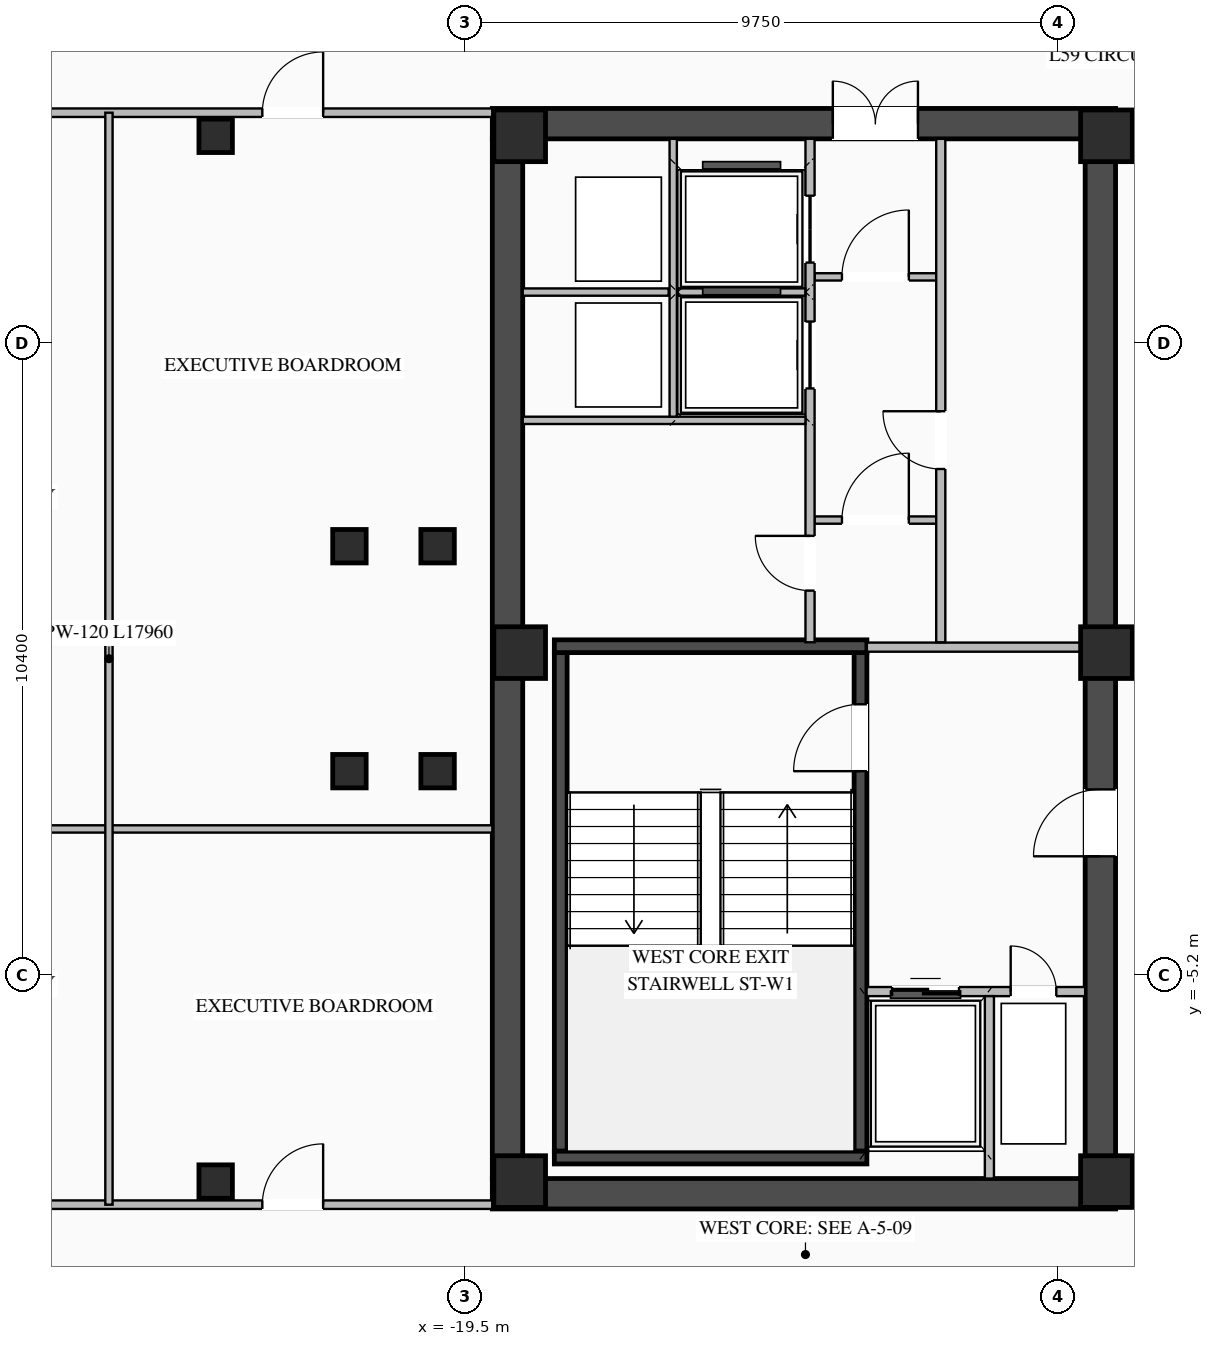
"""IFC4 building model, lengths in metres.
Left out: names, types, materials, properties, quantities, classifications, styles, units other than length and angle.
Written with IfcOpenShell. Run it as: python <this file> out.ifc"""

import sys

from ifc_helpers import new_model, si_unit, direction, frame, frame_2d, origin, origin_2d, place, context, subcontext, project, spatial, rectangle, i_section, extrude, element, fill, save


model = new_model("IFC4")
c1 = context("Model", 3, precision=1e-05, world=origin(), true_north=direction((0.0, 1.0)))
c2 = subcontext(c1, "Body", "Model", "MODEL_VIEW")
j1 = project(units=[si_unit("LENGTHUNIT", "METRE"), si_unit("PLANEANGLEUNIT", "RADIAN")], contexts=[c1])
p1 = place(None, origin())
s1 = spatial("IfcSite", under=j1, at=p1, CompositionType="ELEMENT")
p2 = place(p1, origin())
s2 = spatial("IfcBuilding", under=s1, at=p2, CompositionType="ELEMENT")
p3 = place(p2, frame((0.0, 0.0, 218.85)))
s3 = spatial("IfcBuildingStorey", under=s2, at=p3, CompositionType="ELEMENT", Elevation=218.85)
p4 = place(p3, frame((-19.05, -8.8, 0.0), z_axis=(0.0, 0.0, 1.0), x_axis=(1.0, 0.0, 0.0)))
e1 = element("IfcWall", 1, at=p4, inside=s3, PredefinedType="SHEAR", context=c2, shape_type="SweptSolid", body=[
    extrude(rectangle(XDim=10.25, YDim=0.5, at=frame_2d((5.125, 0.0))), origin(), (0.0, 0.0, 1.0), 3.27),
])
p5 = place(p3, frame((-19.05, 8.8, 0.0), z_axis=(0.0, 0.0, 1.0), x_axis=(1.0, 0.0, 0.0)))
e2 = element("IfcWall", 2, at=p5, inside=s3, PredefinedType="SHEAR", context=c2, shape_type="SweptSolid", body=[
    extrude(rectangle(XDim=10.25, YDim=0.5, at=frame_2d((5.125, 0.0))), origin(), (0.0, 0.0, 1.0), 3.27),
])
p6 = place(p5, frame((5.6, 0.0, 0.0)))
e3 = element("IfcOpeningElement", 3, at=p6, cuts=e2, PredefinedType="OPENING", context=c2, shape_type="SweptSolid", body=[
    extrude(rectangle(XDim=1.4, YDim=2.05, at=frame_2d((0.7, 1.025))), frame((0.0, 0.26, 0.0), z_axis=(0.0, -1.0, 0.0), x_axis=(1.0, 0.0, 0.0)), (0.0, 0.0, 1.0), 0.52),
])
p7 = place(p3, frame((-18.8, -8.55, 0.0), z_axis=(0.0, 0.0, 1.0), x_axis=(0.0, 1.0, 0.0)))
e4 = element("IfcWall", 4, at=p7, inside=s3, PredefinedType="SHEAR", context=c2, shape_type="SweptSolid", body=[
    extrude(rectangle(XDim=17.1, YDim=0.5, at=frame_2d((8.55, 0.0))), origin(), (0.0, 0.0, 1.0), 3.27),
])
p8 = place(p3, frame((-9.05, -8.55, 0.0), z_axis=(0.0, 0.0, 1.0), x_axis=(0.0, 1.0, 0.0)))
e5 = element("IfcWall", 5, at=p8, inside=s3, PredefinedType="SHEAR", context=c2, shape_type="SweptSolid", body=[
    extrude(rectangle(XDim=17.1, YDim=0.5, at=frame_2d((8.55, 0.0))), origin(), (0.0, 0.0, 1.0), 3.27),
])
p9 = place(p8, frame((5.3, 0.0, 0.0)))
e6 = element("IfcOpeningElement", 6, at=p9, cuts=e5, PredefinedType="OPENING", context=c2, shape_type="SweptSolid", body=[
    extrude(rectangle(XDim=1.1, YDim=2.08, at=frame_2d((0.55, 1.04))), frame((0.0, 0.26, 0.0), z_axis=(0.0, -1.0, 0.0), x_axis=(1.0, 0.0, 0.0)), (0.0, 0.0, 1.0), 0.52),
])
p10 = place(p3, frame((-12.995, -8.1, 0.0), z_axis=(0.0, 0.0, 1.0), x_axis=(0.0, 1.0, 0.0)))
e7 = element("IfcWall", 7, at=p10, inside=s3, PredefinedType="SHEAR", context=c2, shape_type="SweptSolid", body=[
    extrude(rectangle(XDim=8.2, YDim=0.21, at=frame_2d((4.1, 0.0))), origin(), (0.0, 0.0, 1.0), 3.27),
])
p11 = place(p10, frame((6.25, 0.0, 0.0)))
e8 = element("IfcOpeningElement", 8, at=p11, cuts=e7, PredefinedType="OPENING", context=c2, shape_type="SweptSolid", body=[
    extrude(rectangle(XDim=1.1, YDim=2.15, at=frame_2d((0.55, 1.075))), frame((0.0, 0.115, 0.0), z_axis=(0.0, -1.0, 0.0), x_axis=(1.0, 0.0, 0.0)), (0.0, 0.0, 1.0), 0.23),
])
p12 = place(p3, frame((-17.925, -8.1, 0.0), z_axis=(0.0, 0.0, 1.0), x_axis=(0.0, 1.0, 0.0)))
e9 = element("IfcWall", 9, at=p12, inside=s3, PredefinedType="SHEAR", context=c2, shape_type="SweptSolid", body=[
    extrude(rectangle(XDim=8.2, YDim=0.21, at=frame_2d((4.1, 0.0))), origin(), (0.0, 0.0, 1.0), 3.27),
])
for number, where, z_axis, x_axis in (
    (10, (-18.03, -8.205, 0.0), (0.0, 0.0, 1.0), (1.0, 0.0, 0.0)),
    (11, (-12.89, 0.205, 0.0), (0.0, 0.0, 1.0), (-1.0, 0.0, 0.0)),
):
    element("IfcWall", number, at=place(p3, frame(where, z_axis=z_axis, x_axis=x_axis)), inside=s3, PredefinedType="SHEAR", context=c2, shape_type="SweptSolid", body=[
        extrude(rectangle(XDim=5.14, YDim=0.21, at=frame_2d((2.57, 0.0))), origin(), (0.0, 0.0, 1.0), 3.27),
    ])
for number, where, z_axis, x_axis in (
    (12, (-8.95, -8.6, 0.0), (0.0, 0.0, 1.0), (1.0, 0.0, 0.0)),
    (13, (-8.95, 0.1, 0.0), (0.0, 0.0, 1.0), (1.0, 0.0, 0.0)),
    (14, (-8.95, 8.6, 0.0), (0.0, 0.0, 1.0), (1.0, 0.0, 0.0)),
    (15, (-18.6, -8.6, 0.0), (0.0, 0.0, 1.0), (1.0, 0.0, 0.0)),
    (16, (-18.6, 0.1, 0.0), (0.0, 0.0, 1.0), (1.0, 0.0, 0.0)),
    (17, (-18.6, 8.6, 0.0), (0.0, 0.0, 1.0), (1.0, 0.0, 0.0)),
):
    element("IfcColumn", number, at=place(p3, frame(where, z_axis=z_axis, x_axis=x_axis)), inside=s3, PredefinedType="COLUMN", context=c2, shape_type="SweptSolid", body=[
        extrude(rectangle(XDim=0.85, YDim=0.85, at=origin_2d()), origin(), (0.0, 0.0, 1.0), 3.45),
    ])
for number, where, z_axis, x_axis in (
    (18, (-21.4, -1.85, 0.0), (0.0, 0.0, 1.0), (1.0, 0.0, 0.0)),
    (19, (-21.4, 1.85, 0.0), (0.0, 0.0, 1.0), (1.0, 0.0, 0.0)),
    (20, (-19.95, -1.85, 0.0), (0.0, 0.0, 1.0), (1.0, 0.0, 0.0)),
    (21, (-19.95, 1.85, 0.0), (0.0, 0.0, 1.0), (1.0, 0.0, 0.0)),
    (22, (-23.6, -8.6, 0.0), (0.0, 0.0, 1.0), (1.0, 0.0, 0.0)),
    (23, (-23.6, 8.6, 0.0), (0.0, 0.0, 1.0), (1.0, 0.0, 0.0)),
):
    element("IfcColumn", number, at=place(p3, frame(where, z_axis=z_axis, x_axis=x_axis)), inside=s3, PredefinedType="COLUMN", context=c2, shape_type="SweptSolid", body=[
        extrude(i_section(OverallWidth=0.55, OverallDepth=0.55, WebThickness=0.024, FlangeThickness=0.036, at=origin_2d()), origin(), (0.0, 0.0, 1.0), 3.45),
    ])
p13 = place(p3, frame((-12.895, -5.475, 0.0), z_axis=(0.0, 0.0, 1.0), x_axis=(1.0, 0.0, 0.0)))
e24 = element("IfcWall", 24, at=p13, inside=s3, PredefinedType="STANDARD", context=c2, shape_type="SweptSolid", body=[
    extrude(rectangle(XDim=3.595, YDim=0.15, at=frame_2d((1.797, 0.0))), origin(), (0.0, 0.0, 1.0), 3.25),
])
p14 = place(p13, frame((0.42, 0.0, 0.0)))
e25 = element("IfcOpeningElement", 25, at=p14, cuts=e24, PredefinedType="OPENING", context=c2, shape_type="SweptSolid", body=[
    extrude(rectangle(XDim=1.1, YDim=2.15, at=frame_2d((0.55, 1.075))), frame((0.0, 0.085, 0.0), z_axis=(0.0, -1.0, 0.0), x_axis=(1.0, 0.0, 0.0)), (0.0, 0.0, 1.0), 0.17),
])
p15 = place(p13, frame((2.37, 0.0, 0.0)))
e26 = element("IfcOpeningElement", 26, at=p15, cuts=e24, PredefinedType="OPENING", context=c2, shape_type="SweptSolid", body=[
    extrude(rectangle(XDim=0.75, YDim=2.05, at=frame_2d((0.375, 1.025))), frame((0.0, 0.085, 0.0), z_axis=(0.0, -1.0, 0.0), x_axis=(1.0, 0.0, 0.0)), (0.0, 0.0, 1.0), 0.17),
])
p16 = place(p3, frame((-10.875, -8.55, 0.0), z_axis=(0.0, 0.0, 1.0), x_axis=(0.0, 1.0, 0.0)))
e27 = element("IfcWall", 27, at=p16, inside=s3, PredefinedType="STANDARD", context=c2, shape_type="SweptSolid", body=[
    extrude(rectangle(XDim=3.0, YDim=0.15, at=frame_2d((1.5, 0.0))), origin(), (0.0, 0.0, 1.0), 3.25),
])
p17 = place(p3, frame((-12.89, 0.19, 0.0), z_axis=(0.0, 0.0, 1.0), x_axis=(1.0, 0.0, 0.0)))
e28 = element("IfcWall", 28, at=p17, inside=s3, PredefinedType="STANDARD", context=c2, shape_type="SweptSolid", body=[
    extrude(rectangle(XDim=3.59, YDim=0.15, at=frame_2d((1.795, 0.0))), origin(), (0.0, 0.0, 1.0), 2.645),
])
p18 = place(p3, frame((-13.75, 2.28, 0.0), z_axis=(0.0, 0.0, 1.0), x_axis=(1.0, 0.0, 0.0)))
e29 = element("IfcWall", 29, at=p18, inside=s3, PredefinedType="STANDARD", context=c2, shape_type="SweptSolid", body=[
    extrude(rectangle(XDim=2.0, YDim=0.12, at=frame_2d((1.0, 0.0))), origin(), (0.0, 0.0, 1.0), 3.25),
])
p19 = place(p18, frame((0.45, 0.0, 0.0)))
e30 = element("IfcOpeningElement", 30, at=p19, cuts=e29, PredefinedType="OPENING", context=c2, shape_type="SweptSolid", body=[
    extrude(rectangle(XDim=1.1, YDim=2.1, at=frame_2d((0.55, 1.05))), frame((0.0, 0.07, 0.0), z_axis=(0.0, -1.0, 0.0), x_axis=(1.0, 0.0, 0.0)), (0.0, 0.0, 1.0), 0.14),
])
p20 = place(p3, frame((-13.75, 6.28, 0.0), z_axis=(0.0, 0.0, 1.0), x_axis=(1.0, 0.0, 0.0)))
e31 = element("IfcWall", 31, at=p20, inside=s3, PredefinedType="STANDARD", context=c2, shape_type="SweptSolid", body=[
    extrude(rectangle(XDim=2.0, YDim=0.12, at=frame_2d((1.0, 0.0))), origin(), (0.0, 0.0, 1.0), 3.25),
])
p21 = place(p20, frame((0.45, 0.0, 0.0)))
e32 = element("IfcOpeningElement", 32, at=p21, cuts=e31, PredefinedType="OPENING", context=c2, shape_type="SweptSolid", body=[
    extrude(rectangle(XDim=1.1, YDim=2.1, at=frame_2d((0.55, 1.05))), frame((0.0, 0.07, 0.0), z_axis=(0.0, -1.0, 0.0), x_axis=(1.0, 0.0, 0.0)), (0.0, 0.0, 1.0), 0.14),
])
p22 = place(p3, frame((-11.675, 0.27, 0.0), z_axis=(0.0, 0.0, 1.0), x_axis=(0.0, 1.0, 0.0)))
e33 = element("IfcWall", 33, at=p22, inside=s3, PredefinedType="STANDARD", context=c2, shape_type="SweptSolid", body=[
    extrude(rectangle(XDim=8.28, YDim=0.15, at=frame_2d((4.14, 0.0))), origin(), (0.0, 0.0, 1.0), 3.25),
])
p23 = place(p22, frame((2.85, 0.0, 0.0)))
e34 = element("IfcOpeningElement", 34, at=p23, cuts=e33, PredefinedType="OPENING", context=c2, shape_type="SweptSolid", body=[
    extrude(rectangle(XDim=0.95, YDim=2.05, at=frame_2d((0.475, 1.025))), frame((0.0, 0.085, 0.0), z_axis=(0.0, -1.0, 0.0), x_axis=(1.0, 0.0, 0.0)), (0.0, 0.0, 1.0), 0.17),
])
p24 = place(p3, frame((-13.825, 0.27, 0.0), z_axis=(0.0, 0.0, 1.0), x_axis=(0.0, 1.0, 0.0)))
e35 = element("IfcWall", 35, at=p24, inside=s3, PredefinedType="STANDARD", context=c2, shape_type="SweptSolid", body=[
    extrude(rectangle(XDim=8.28, YDim=0.15, at=frame_2d((4.14, 0.0))), origin(), (0.0, 0.0, 1.0), 3.25),
])
p25 = place(p24, frame((4.175, 0.0, 0.0)))
e36 = element("IfcOpeningElement", 36, at=p25, cuts=e35, PredefinedType="OPENING", context=c2, shape_type="SweptSolid", body=[
    extrude(rectangle(XDim=1.1, YDim=2.1, at=frame_2d((0.55, 1.05))), frame((0.0, 0.085, 0.0), z_axis=(0.0, -1.0, 0.0), x_axis=(1.0, 0.0, 0.0)), (0.0, 0.0, 1.0), 0.17),
])
p26 = place(p24, frame((6.245, 0.0, 0.0)))
e37 = element("IfcOpeningElement", 37, at=p26, cuts=e35, PredefinedType="OPENING", context=c2, shape_type="SweptSolid", body=[
    extrude(rectangle(XDim=1.1, YDim=2.1, at=frame_2d((0.55, 1.05))), frame((0.0, 0.085, 0.0), z_axis=(0.0, -1.0, 0.0), x_axis=(1.0, 0.0, 0.0)), (0.0, 0.0, 1.0), 0.17),
])
p27 = place(p24, frame((0.85, 0.0, 0.0)))
e38 = element("IfcOpeningElement", 38, at=p27, cuts=e35, PredefinedType="OPENING", context=c2, shape_type="SweptSolid", body=[
    extrude(rectangle(XDim=0.9, YDim=2.05, at=frame_2d((0.45, 1.025))), frame((0.0, 0.085, 0.0), z_axis=(0.0, -1.0, 0.0), x_axis=(1.0, 0.0, 0.0)), (0.0, 0.0, 1.0), 0.17),
])
p28 = place(p3, frame((-18.55, 3.92, 0.0), z_axis=(0.0, 0.0, 1.0), x_axis=(1.0, 0.0, 0.0)))
e39 = element("IfcWall", 39, at=p28, inside=s3, PredefinedType="STANDARD", context=c2, shape_type="SweptSolid", body=[
    extrude(rectangle(XDim=4.65, YDim=0.12, at=frame_2d((2.325, 0.0))), origin(), (0.0, 0.0, 1.0), 3.25),
])
p29 = place(p3, frame((-18.55, 6.03, 0.0), z_axis=(0.0, 0.0, 1.0), x_axis=(1.0, 0.0, 0.0)))
e40 = element("IfcWall", 40, at=p29, inside=s3, PredefinedType="STANDARD", context=c2, shape_type="SweptSolid", body=[
    extrude(rectangle(XDim=2.4, YDim=0.12, at=frame_2d((1.2, 0.0))), origin(), (0.0, 0.0, 1.0), 3.25),
])
p30 = place(p3, frame((-16.075, 3.98, 0.0), z_axis=(0.0, 0.0, 1.0), x_axis=(0.0, 1.0, 0.0)))
e41 = element("IfcWall", 41, at=p30, inside=s3, PredefinedType="STANDARD", context=c2, shape_type="SweptSolid", body=[
    extrude(rectangle(XDim=4.57, YDim=0.12, at=frame_2d((2.285, 0.0))), origin(), (0.0, 0.0, 1.0), 3.25),
])
p31 = place(p3, frame((-16.0, 6.03, 0.0), z_axis=(0.0, 0.0, 1.0), x_axis=(1.0, 0.0, 0.0)))
e42 = element("IfcWall", 42, at=p31, inside=s3, PredefinedType="STANDARD", context=c2, shape_type="SweptSolid", body=[
    extrude(rectangle(XDim=2.1, YDim=0.12, at=frame_2d((1.05, 0.0))), origin(), (0.0, 0.0, 1.0), 3.25),
])
p32 = place(p3, frame((-29.62, 8.98, 0.0), z_axis=(0.0, 0.0, 1.0), x_axis=(1.0, 0.0, 0.0)))
e43 = element("IfcWall", 43, at=p32, inside=s3, PredefinedType="STANDARD", context=c2, shape_type="SweptSolid", body=[
    extrude(rectangle(XDim=10.57, YDim=0.14, at=frame_2d((5.285, 0.0))), origin(), (0.0, 0.0, 1.0), 3.25),
])
p33 = place(p32, frame((1.762, 0.0, 0.0)))
e44 = element("IfcOpeningElement", 44, at=p33, cuts=e43, PredefinedType="OPENING", context=c2, shape_type="SweptSolid", body=[
    extrude(rectangle(XDim=1.0, YDim=2.08, at=frame_2d((0.5, 1.04))), frame((0.0, 0.08, 0.0), z_axis=(0.0, -1.0, 0.0), x_axis=(1.0, 0.0, 0.0)), (0.0, 0.0, 1.0), 0.16),
])
p34 = place(p32, frame((6.788, 0.0, 0.0)))
e45 = element("IfcOpeningElement", 45, at=p34, cuts=e43, PredefinedType="OPENING", context=c2, shape_type="SweptSolid", body=[
    extrude(rectangle(XDim=1.0, YDim=2.08, at=frame_2d((0.5, 1.04))), frame((0.0, 0.08, 0.0), z_axis=(0.0, -1.0, 0.0), x_axis=(1.0, 0.0, 0.0)), (0.0, 0.0, 1.0), 0.16),
])
p35 = place(p3, frame((-29.62, -8.98, 0.0), z_axis=(0.0, 0.0, 1.0), x_axis=(1.0, 0.0, 0.0)))
e46 = element("IfcWall", 46, at=p35, inside=s3, PredefinedType="STANDARD", context=c2, shape_type="SweptSolid", body=[
    extrude(rectangle(XDim=10.57, YDim=0.14, at=frame_2d((5.285, 0.0))), origin(), (0.0, 0.0, 1.0), 3.25),
])
p36 = place(p35, frame((1.762, 0.0, 0.0)))
e47 = element("IfcOpeningElement", 47, at=p36, cuts=e46, PredefinedType="OPENING", context=c2, shape_type="SweptSolid", body=[
    extrude(rectangle(XDim=1.0, YDim=2.08, at=frame_2d((0.5, 1.04))), frame((0.0, 0.08, 0.0), z_axis=(0.0, -1.0, 0.0), x_axis=(1.0, 0.0, 0.0)), (0.0, 0.0, 1.0), 0.16),
])
p37 = place(p35, frame((6.788, 0.0, 0.0)))
e48 = element("IfcOpeningElement", 48, at=p37, cuts=e46, PredefinedType="OPENING", context=c2, shape_type="SweptSolid", body=[
    extrude(rectangle(XDim=1.0, YDim=2.08, at=frame_2d((0.5, 1.04))), frame((0.0, 0.08, 0.0), z_axis=(0.0, -1.0, 0.0), x_axis=(1.0, 0.0, 0.0)), (0.0, 0.0, 1.0), 0.16),
])
p38 = place(p3, frame((-29.62, -2.8, 0.0), z_axis=(0.0, 0.0, 1.0), x_axis=(1.0, 0.0, 0.0)))
e49 = element("IfcWall", 49, at=p38, inside=s3, PredefinedType="STANDARD", context=c2, shape_type="SweptSolid", body=[
    extrude(rectangle(XDim=10.57, YDim=0.12, at=frame_2d((5.285, 0.0))), origin(), (0.0, 0.0, 1.0), 3.25),
])
p39 = place(p3, frame((-25.355, -8.98, 0.0), z_axis=(0.0, 0.0, 1.0), x_axis=(0.0, 1.0, 0.0)))
e50 = element("IfcWall", 50, at=p39, inside=s3, PredefinedType="STANDARD", context=c2, shape_type="SweptSolid", body=[
    extrude(rectangle(XDim=17.96, YDim=0.12, at=frame_2d((8.98, 0.0))), origin(), (0.0, 0.0, 1.0), 3.25),
])
p40 = place(p11, origin())
e51 = element("IfcDoor", 51, at=p40, inside=s3, OperationType="SINGLE_SWING_LEFT", PredefinedType="DOOR", context=c2, shape_type="SweptSolid", body=[
    extrude(rectangle(XDim=1.1, YDim=2.15, at=frame_2d((0.55, 1.075))), frame((0.0, 0.025, 0.0), z_axis=(0.0, -1.0, 0.0), x_axis=(1.0, 0.0, 0.0)), (0.0, 0.0, 1.0), 0.05),
])
fill(e8, e51)
p41 = place(p14, origin())
e52 = element("IfcDoor", 52, at=p41, inside=s3, OperationType="DOUBLE_DOOR_SLIDING", PredefinedType="DOOR", context=c2, shape_type="SweptSolid", body=[
    extrude(rectangle(XDim=1.1, YDim=2.15, at=frame_2d((0.55, 1.075))), frame((0.0, 0.025, 0.0), z_axis=(0.0, -1.0, 0.0), x_axis=(1.0, 0.0, 0.0)), (0.0, 0.0, 1.0), 0.05),
])
fill(e25, e52)
p42 = place(p15, origin())
e53 = element("IfcDoor", 53, at=p42, inside=s3, OperationType="SINGLE_SWING_LEFT", PredefinedType="DOOR", context=c2, shape_type="SweptSolid", body=[
    extrude(rectangle(XDim=0.75, YDim=2.05, at=frame_2d((0.375, 1.025))), frame((0.0, 0.025, 0.0), z_axis=(0.0, -1.0, 0.0), x_axis=(1.0, 0.0, 0.0)), (0.0, 0.0, 1.0), 0.05),
])
fill(e26, e53)
p43 = place(p9, origin())
e54 = element("IfcDoor", 54, at=p43, inside=s3, OperationType="SINGLE_SWING_LEFT", PredefinedType="DOOR", context=c2, shape_type="SweptSolid", body=[
    extrude(rectangle(XDim=1.1, YDim=2.08, at=frame_2d((0.55, 1.04))), frame((0.0, 0.205, 0.0), z_axis=(0.0, -1.0, 0.0), x_axis=(1.0, 0.0, 0.0)), (0.0, 0.0, 1.0), 0.05),
])
fill(e6, e54)
p44 = place(p19, origin())
e55 = element("IfcDoor", 55, at=p44, inside=s3, OperationType="SINGLE_SWING_RIGHT", PredefinedType="DOOR", context=c2, shape_type="SweptSolid", body=[
    extrude(rectangle(XDim=1.1, YDim=2.1, at=frame_2d((0.55, 1.05))), frame((0.0, 0.025, 0.0), z_axis=(0.0, -1.0, 0.0), x_axis=(1.0, 0.0, 0.0)), (0.0, 0.0, 1.0), 0.05),
])
fill(e30, e55)
p45 = place(p21, origin())
e56 = element("IfcDoor", 56, at=p45, inside=s3, OperationType="SINGLE_SWING_RIGHT", PredefinedType="DOOR", context=c2, shape_type="SweptSolid", body=[
    extrude(rectangle(XDim=1.1, YDim=2.1, at=frame_2d((0.55, 1.05))), frame((0.0, 0.025, 0.0), z_axis=(0.0, -1.0, 0.0), x_axis=(1.0, 0.0, 0.0)), (0.0, 0.0, 1.0), 0.05),
])
fill(e32, e56)
p46 = place(p6, origin())
e57 = element("IfcDoor", 57, at=p46, inside=s3, OperationType="DOUBLE_DOOR_SINGLE_SWING", PredefinedType="DOOR", context=c2, shape_type="SweptSolid", body=[
    extrude(rectangle(XDim=1.4, YDim=2.05, at=frame_2d((0.7, 1.025))), frame((0.0, 0.195, 0.0), z_axis=(0.0, -1.0, 0.0), x_axis=(1.0, 0.0, 0.0)), (0.0, 0.0, 1.0), 0.05),
])
fill(e3, e57)
p47 = place(p23, origin())
e58 = element("IfcDoor", 58, at=p47, inside=s3, OperationType="SINGLE_SWING_RIGHT", PredefinedType="DOOR", context=c2, shape_type="SweptSolid", body=[
    extrude(rectangle(XDim=0.95, YDim=2.05, at=frame_2d((0.475, 1.025))), frame((0.0, 0.025, 0.0), z_axis=(0.0, -1.0, 0.0), x_axis=(1.0, 0.0, 0.0)), (0.0, 0.0, 1.0), 0.05),
])
fill(e34, e58)
p48 = place(p25, origin())
e59 = element("IfcDoor", 59, at=p48, inside=s3, OperationType="DOUBLE_DOOR_SLIDING", PredefinedType="DOOR", context=c2, shape_type="SweptSolid", body=[
    extrude(rectangle(XDim=1.1, YDim=2.1, at=frame_2d((0.55, 1.05))), frame((0.0, 0.025, 0.0), z_axis=(0.0, -1.0, 0.0), x_axis=(1.0, 0.0, 0.0)), (0.0, 0.0, 1.0), 0.05),
])
fill(e36, e59)
p49 = place(p26, origin())
e60 = element("IfcDoor", 60, at=p49, inside=s3, OperationType="DOUBLE_DOOR_SLIDING", PredefinedType="DOOR", context=c2, shape_type="SweptSolid", body=[
    extrude(rectangle(XDim=1.1, YDim=2.1, at=frame_2d((0.55, 1.05))), frame((0.0, 0.025, 0.0), z_axis=(0.0, -1.0, 0.0), x_axis=(1.0, 0.0, 0.0)), (0.0, 0.0, 1.0), 0.05),
])
fill(e37, e60)
p50 = place(p27, origin())
e61 = element("IfcDoor", 61, at=p50, inside=s3, OperationType="SINGLE_SWING_RIGHT", PredefinedType="DOOR", context=c2, shape_type="SweptSolid", body=[
    extrude(rectangle(XDim=0.9, YDim=2.05, at=frame_2d((0.45, 1.025))), frame((0.0, 0.025, 0.0), z_axis=(0.0, -1.0, 0.0), x_axis=(1.0, 0.0, 0.0)), (0.0, 0.0, 1.0), 0.05),
])
fill(e38, e61)
p51 = place(p34, origin())
e62 = element("IfcDoor", 62, at=p51, inside=s3, OperationType="SINGLE_SWING_RIGHT", PredefinedType="DOOR", context=c2, shape_type="SweptSolid", body=[
    extrude(rectangle(XDim=1.0, YDim=2.08, at=frame_2d((0.5, 1.04))), frame((0.0, 0.025, 0.0), z_axis=(0.0, -1.0, 0.0), x_axis=(1.0, 0.0, 0.0)), (0.0, 0.0, 1.0), 0.05),
])
fill(e45, e62)
p52 = place(p37, origin())
e63 = element("IfcDoor", 63, at=p52, inside=s3, OperationType="SINGLE_SWING_RIGHT", PredefinedType="DOOR", context=c2, shape_type="SweptSolid", body=[
    extrude(rectangle(XDim=1.0, YDim=2.08, at=frame_2d((0.5, 1.04))), frame((0.0, 0.025, 0.0), z_axis=(0.0, -1.0, 0.0), x_axis=(1.0, 0.0, 0.0)), (0.0, 0.0, 1.0), 0.05),
])
fill(e48, e63)
save(model, sys.argv[1])
